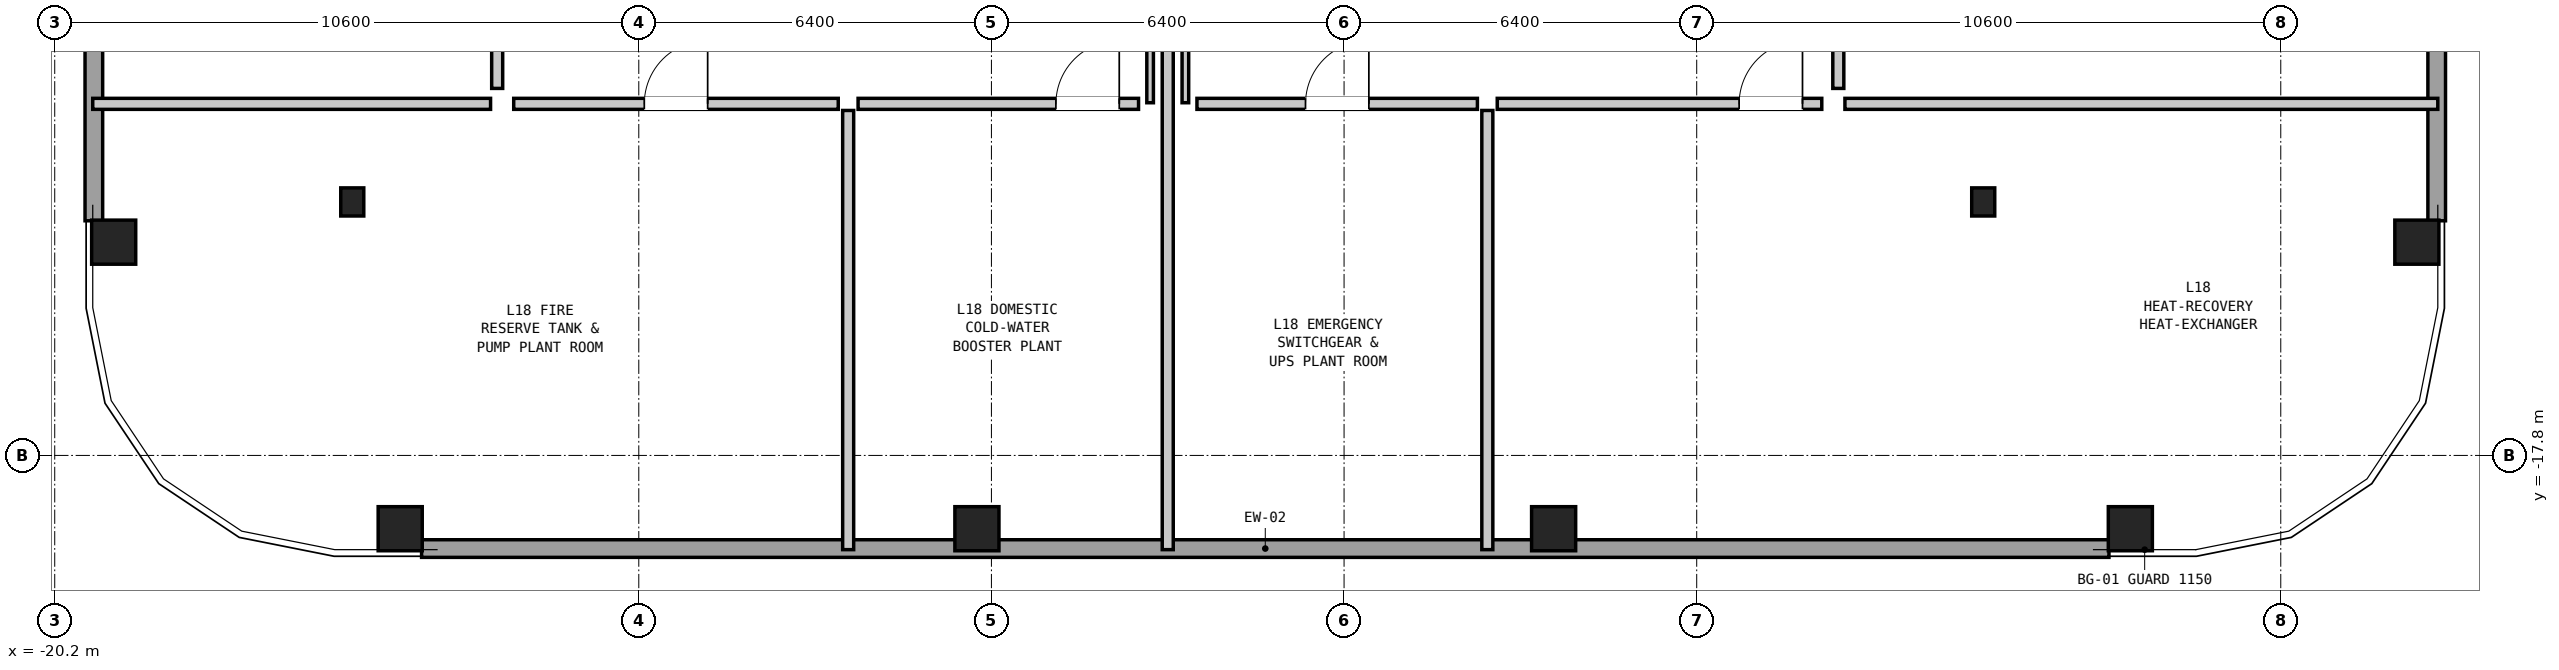
"""IFC4 building model, lengths in metres.
Left out: names, types, materials, properties, quantities, classifications, styles, units other than length and angle.
Written with IfcOpenShell. Run it as: python <this file> out.ifc"""

import sys

from ifc_helpers import new_model, si_unit, direction, frame, frame_2d, origin, origin_2d, place, context, subcontext, project, spatial, rectangle, hollow_rectangle, i_section, extrude, element, fill, save


model = new_model("IFC4")
c1 = context("Model", 3, precision=1e-05, world=origin(), true_north=direction((0.0, 1.0)))
c2 = subcontext(c1, "Body", "Model", "MODEL_VIEW")
j1 = project(units=[si_unit("LENGTHUNIT", "METRE"), si_unit("PLANEANGLEUNIT", "RADIAN")], contexts=[c1])
p1 = place(None, origin())
s1 = spatial("IfcSite", under=j1, at=p1, CompositionType="ELEMENT")
p2 = place(p1, origin())
s2 = spatial("IfcBuilding", under=s1, at=p2, CompositionType="ELEMENT")
p3 = place(p2, frame((0.0, 0.0, 65.1)))
s3 = spatial("IfcBuildingStorey", under=s2, at=p3, CompositionType="ELEMENT", Elevation=65.1)
for number, where, z_axis, x_axis in (
    (1, (-13.93, -19.13, 0.0), (0.0, 0.0, 1.0), (1.0, 0.0, 0.0)),
    (2, (-3.463, -19.13, 0.0), (0.0, 0.0, 1.0), (1.0, 0.0, 0.0)),
    (3, (7.003, -19.13, 0.0), (0.0, 0.0, 1.0), (1.0, 0.0, 0.0)),
    (4, (17.47, -19.13, 0.0), (0.0, 0.0, 1.0), (1.0, 0.0, 0.0)),
    (5, (22.67, -13.93, 0.0), (0.0, 0.0, 1.0), (0.0, 1.0, 0.0)),
    (6, (-19.13, -13.93, 0.0), (0.0, 0.0, 1.0), (0.0, 1.0, 0.0)),
):
    element("IfcColumn", number, at=place(p3, frame(where, z_axis=z_axis, x_axis=x_axis)), inside=s3, PredefinedType="COLUMN", context=c2, shape_type="SweptSolid", body=[
        extrude(hollow_rectangle(XDim=0.8, YDim=0.8, WallThickness=0.05, at=origin_2d()), origin(), (0.0, 0.0, 1.0), 4.35),
    ])
for number, where, z_axis, x_axis in (
    (7, (-14.8, -13.2, 0.0), (0.0, 0.0, 1.0), (1.0, 0.0, 0.0)),
    (8, (14.8, -13.2, 0.0), (0.0, 0.0, 1.0), (1.0, 0.0, 0.0)),
):
    element("IfcColumn", number, at=place(p3, frame(where, z_axis=z_axis, x_axis=x_axis)), inside=s3, PredefinedType="COLUMN", context=c2, shape_type="SweptSolid", body=[
        extrude(i_section(OverallWidth=0.418, OverallDepth=0.51, WebThickness=0.042, FlangeThickness=0.068, at=origin_2d()), origin(), (0.0, 0.0, 1.0), 4.35),
    ])
for number, where, z_axis, x_axis in (
    (9, (17.082, -19.49, 0.0), (0.0, 0.0, 1.0), (-1.0, 0.0, 0.0)),
    (10, (23.03, 17.082, 0.0), (0.0, 0.0, 1.0), (0.0, -1.0, 0.0)),
    (11, (-19.49, -13.542, 0.0), (0.0, 0.0, 1.0), (0.0, 1.0, 0.0)),
):
    element("IfcWall", number, at=place(p3, frame(where, z_axis=z_axis, x_axis=x_axis)), inside=s3, PredefinedType="SOLIDWALL", context=c2, shape_type="SweptSolid", body=[
        extrude(rectangle(XDim=30.624, YDim=0.32, at=frame_2d((15.312, 0.0))), origin(), (0.0, 0.0, 1.0), 2.31),
    ])
p4 = place(p3, frame((0.0, -19.51, 0.0), z_axis=(0.0, 0.0, 1.0), x_axis=(0.0, 1.0, 0.0)))
e12 = element("IfcWall", 12, at=p4, inside=s3, PredefinedType="PARTITIONING", context=c2, shape_type="SweptSolid", body=[
    extrude(rectangle(XDim=10.47, YDim=0.2, at=frame_2d((5.235, 0.0))), origin(), (0.0, 0.0, 1.0), 2.31),
])
for number, where, z_axis, x_axis in (
    (13, (-0.32, -11.4, 0.0), (0.0, 0.0, 1.0), (0.0, 1.0, 0.0)),
    (14, (0.32, -11.4, 0.0), (0.0, 0.0, 1.0), (0.0, 1.0, 0.0)),
):
    element("IfcWall", number, at=place(p3, frame(where, z_axis=z_axis, x_axis=x_axis)), inside=s3, PredefinedType="PARTITIONING", context=c2, shape_type="SweptSolid", body=[
        extrude(rectangle(XDim=2.36, YDim=0.12, at=frame_2d((1.18, 0.0))), origin(), (0.0, 0.0, 1.0), 2.31),
    ])
p5 = place(p3, frame((-11.87, -11.42, 0.0), z_axis=(0.0, 0.0, 1.0), x_axis=(1.0, 0.0, 0.0)))
e15 = element("IfcWall", 15, at=p5, inside=s3, PredefinedType="PARTITIONING", context=c2, shape_type="SweptSolid", body=[
    extrude(rectangle(XDim=5.89, YDim=0.2, at=frame_2d((2.945, 0.0))), origin(), (0.0, 0.0, 1.0), 3.574),
])
p6 = place(p5, frame((2.37, 0.0, 0.0)))
e16 = element("IfcOpeningElement", 16, at=p6, cuts=e15, PredefinedType="OPENING", context=c2, shape_type="SweptSolid", body=[
    extrude(rectangle(XDim=1.15, YDim=2.1, at=frame_2d((0.575, 1.05))), frame((0.0, 0.112, 0.0), z_axis=(0.0, -1.0, 0.0), x_axis=(1.0, 0.0, 0.0)), (0.0, 0.0, 1.0), 0.224),
])
p7 = place(p3, frame((-5.8, -19.51, 0.0), z_axis=(0.0, 0.0, 1.0), x_axis=(0.0, 1.0, 0.0)))
e17 = element("IfcWall", 17, at=p7, inside=s3, PredefinedType="PARTITIONING", context=c2, shape_type="SweptSolid", body=[
    extrude(rectangle(XDim=7.97, YDim=0.2, at=frame_2d((3.985, 0.0))), origin(), (0.0, 0.0, 1.0), 3.574),
])
p8 = place(p3, frame((-5.62, -11.42, 0.0), z_axis=(0.0, 0.0, 1.0), x_axis=(1.0, 0.0, 0.0)))
e18 = element("IfcWall", 18, at=p8, inside=s3, PredefinedType="PARTITIONING", context=c2, shape_type="SweptSolid", body=[
    extrude(rectangle(XDim=5.09, YDim=0.2, at=frame_2d((2.545, 0.0))), origin(), (0.0, 0.0, 1.0), 4.13),
])
p9 = place(p8, frame((3.59, 0.0, 0.0)))
e19 = element("IfcOpeningElement", 19, at=p9, cuts=e18, PredefinedType="OPENING", context=c2, shape_type="SweptSolid", body=[
    extrude(rectangle(XDim=1.15, YDim=2.1, at=frame_2d((0.575, 1.05))), frame((0.0, 0.112, 0.0), z_axis=(0.0, -1.0, 0.0), x_axis=(1.0, 0.0, 0.0)), (0.0, 0.0, 1.0), 0.224),
])
p10 = place(p3, frame((0.53, -11.42, 0.0), z_axis=(0.0, 0.0, 1.0), x_axis=(1.0, 0.0, 0.0)))
e20 = element("IfcWall", 20, at=p10, inside=s3, PredefinedType="PARTITIONING", context=c2, shape_type="SweptSolid", body=[
    extrude(rectangle(XDim=5.09, YDim=0.2, at=frame_2d((2.545, 0.0))), origin(), (0.0, 0.0, 1.0), 4.13),
])
p11 = place(p10, frame((1.97, 0.0, 0.0)))
e21 = element("IfcOpeningElement", 21, at=p11, cuts=e20, PredefinedType="OPENING", context=c2, shape_type="SweptSolid", body=[
    extrude(rectangle(XDim=1.15, YDim=2.1, at=frame_2d((0.575, 1.05))), frame((0.0, 0.112, 0.0), z_axis=(0.0, -1.0, 0.0), x_axis=(1.0, 0.0, 0.0)), (0.0, 0.0, 1.0), 0.224),
])
p12 = place(p3, frame((5.8, -19.51, 0.0), z_axis=(0.0, 0.0, 1.0), x_axis=(0.0, 1.0, 0.0)))
e22 = element("IfcWall", 22, at=p12, inside=s3, PredefinedType="PARTITIONING", context=c2, shape_type="SweptSolid", body=[
    extrude(rectangle(XDim=7.97, YDim=0.2, at=frame_2d((3.985, 0.0))), origin(), (0.0, 0.0, 1.0), 3.574),
])
p13 = place(p3, frame((5.98, -11.42, 0.0), z_axis=(0.0, 0.0, 1.0), x_axis=(1.0, 0.0, 0.0)))
e23 = element("IfcWall", 23, at=p13, inside=s3, PredefinedType="PARTITIONING", context=c2, shape_type="SweptSolid", body=[
    extrude(rectangle(XDim=5.89, YDim=0.2, at=frame_2d((2.945, 0.0))), origin(), (0.0, 0.0, 1.0), 3.574),
])
p14 = place(p13, frame((4.39, 0.0, 0.0)))
e24 = element("IfcOpeningElement", 24, at=p14, cuts=e23, PredefinedType="OPENING", context=c2, shape_type="SweptSolid", body=[
    extrude(rectangle(XDim=1.15, YDim=2.1, at=frame_2d((0.575, 1.05))), frame((0.0, 0.112, 0.0), z_axis=(0.0, -1.0, 0.0), x_axis=(1.0, 0.0, 0.0)), (0.0, 0.0, 1.0), 0.224),
])
p15 = place(p3, frame((-19.51, -11.42, 0.0), z_axis=(0.0, 0.0, 1.0), x_axis=(1.0, 0.0, 0.0)))
e25 = element("IfcWall", 25, at=p15, inside=s3, PredefinedType="PARTITIONING", context=c2, shape_type="SweptSolid", body=[
    extrude(rectangle(XDim=7.22, YDim=0.2, at=frame_2d((3.61, 0.0))), origin(), (0.0, 0.0, 1.0), 3.574),
])
p16 = place(p3, frame((12.29, -11.42, 0.0), z_axis=(0.0, 0.0, 1.0), x_axis=(1.0, 0.0, 0.0)))
e26 = element("IfcWall", 26, at=p16, inside=s3, PredefinedType="PARTITIONING", context=c2, shape_type="SweptSolid", body=[
    extrude(rectangle(XDim=10.76, YDim=0.2, at=frame_2d((5.38, 0.0))), origin(), (0.0, 0.0, 1.0), 3.574),
])
p17 = place(p3, frame((-12.17, -11.14, 0.0), z_axis=(0.0, 0.0, 1.0), x_axis=(0.0, 1.0, 0.0)))
e27 = element("IfcWall", 27, at=p17, inside=s3, PredefinedType="PARTITIONING", context=c2, shape_type="SweptSolid", body=[
    extrude(rectangle(XDim=11.53, YDim=0.2, at=frame_2d((5.765, 0.0))), origin(), (0.0, 0.0, 1.0), 2.31),
])
p18 = place(p17, frame((5.19, 0.0, 0.0)))
e28 = element("IfcOpeningElement", 28, at=p18, cuts=e27, PredefinedType="OPENING", context=c2, shape_type="SweptSolid", body=[
    extrude(rectangle(XDim=1.15, YDim=2.1, at=frame_2d((0.575, 1.05))), frame((0.0, 0.112, 0.0), z_axis=(0.0, -1.0, 0.0), x_axis=(1.0, 0.0, 0.0)), (0.0, 0.0, 1.0), 0.224),
])
p19 = place(p3, frame((12.17, -11.14, 0.0), z_axis=(0.0, 0.0, 1.0), x_axis=(0.0, 1.0, 0.0)))
e29 = element("IfcWall", 29, at=p19, inside=s3, PredefinedType="PARTITIONING", context=c2, shape_type="SweptSolid", body=[
    extrude(rectangle(XDim=11.53, YDim=0.2, at=frame_2d((5.765, 0.0))), origin(), (0.0, 0.0, 1.0), 4.13),
])
p20 = place(p19, frame((5.19, 0.0, 0.0)))
e30 = element("IfcOpeningElement", 30, at=p20, cuts=e29, PredefinedType="OPENING", context=c2, shape_type="SweptSolid", body=[
    extrude(rectangle(XDim=1.15, YDim=2.1, at=frame_2d((0.575, 1.05))), frame((0.0, 0.112, 0.0), z_axis=(0.0, -1.0, 0.0), x_axis=(1.0, 0.0, 0.0)), (0.0, 0.0, 1.0), 0.224),
])
p21 = place(p6, origin())
e31 = element("IfcDoor", 31, at=p21, inside=s3, OperationType="SINGLE_SWING_RIGHT", PredefinedType="DOOR", context=c2, shape_type="SweptSolid", body=[
    extrude(rectangle(XDim=1.15, YDim=2.1, at=frame_2d((0.575, 1.05))), frame((0.0, 0.025, 0.0), z_axis=(0.0, -1.0, 0.0), x_axis=(1.0, 0.0, 0.0)), (0.0, 0.0, 1.0), 0.05),
])
fill(e16, e31)
p22 = place(p9, origin())
e32 = element("IfcDoor", 32, at=p22, inside=s3, OperationType="SINGLE_SWING_RIGHT", PredefinedType="DOOR", context=c2, shape_type="SweptSolid", body=[
    extrude(rectangle(XDim=1.15, YDim=2.1, at=frame_2d((0.575, 1.05))), frame((0.0, 0.025, 0.0), z_axis=(0.0, -1.0, 0.0), x_axis=(1.0, 0.0, 0.0)), (0.0, 0.0, 1.0), 0.05),
])
fill(e19, e32)
p23 = place(p11, origin())
e33 = element("IfcDoor", 33, at=p23, inside=s3, OperationType="SINGLE_SWING_RIGHT", PredefinedType="DOOR", context=c2, shape_type="SweptSolid", body=[
    extrude(rectangle(XDim=1.15, YDim=2.1, at=frame_2d((0.575, 1.05))), frame((0.0, 0.025, 0.0), z_axis=(0.0, -1.0, 0.0), x_axis=(1.0, 0.0, 0.0)), (0.0, 0.0, 1.0), 0.05),
])
fill(e21, e33)
p24 = place(p14, origin())
e34 = element("IfcDoor", 34, at=p24, inside=s3, OperationType="SINGLE_SWING_RIGHT", PredefinedType="DOOR", context=c2, shape_type="SweptSolid", body=[
    extrude(rectangle(XDim=1.15, YDim=2.1, at=frame_2d((0.575, 1.05))), frame((0.0, 0.025, 0.0), z_axis=(0.0, -1.0, 0.0), x_axis=(1.0, 0.0, 0.0)), (0.0, 0.0, 1.0), 0.05),
])
fill(e24, e34)
save(model, sys.argv[1])
